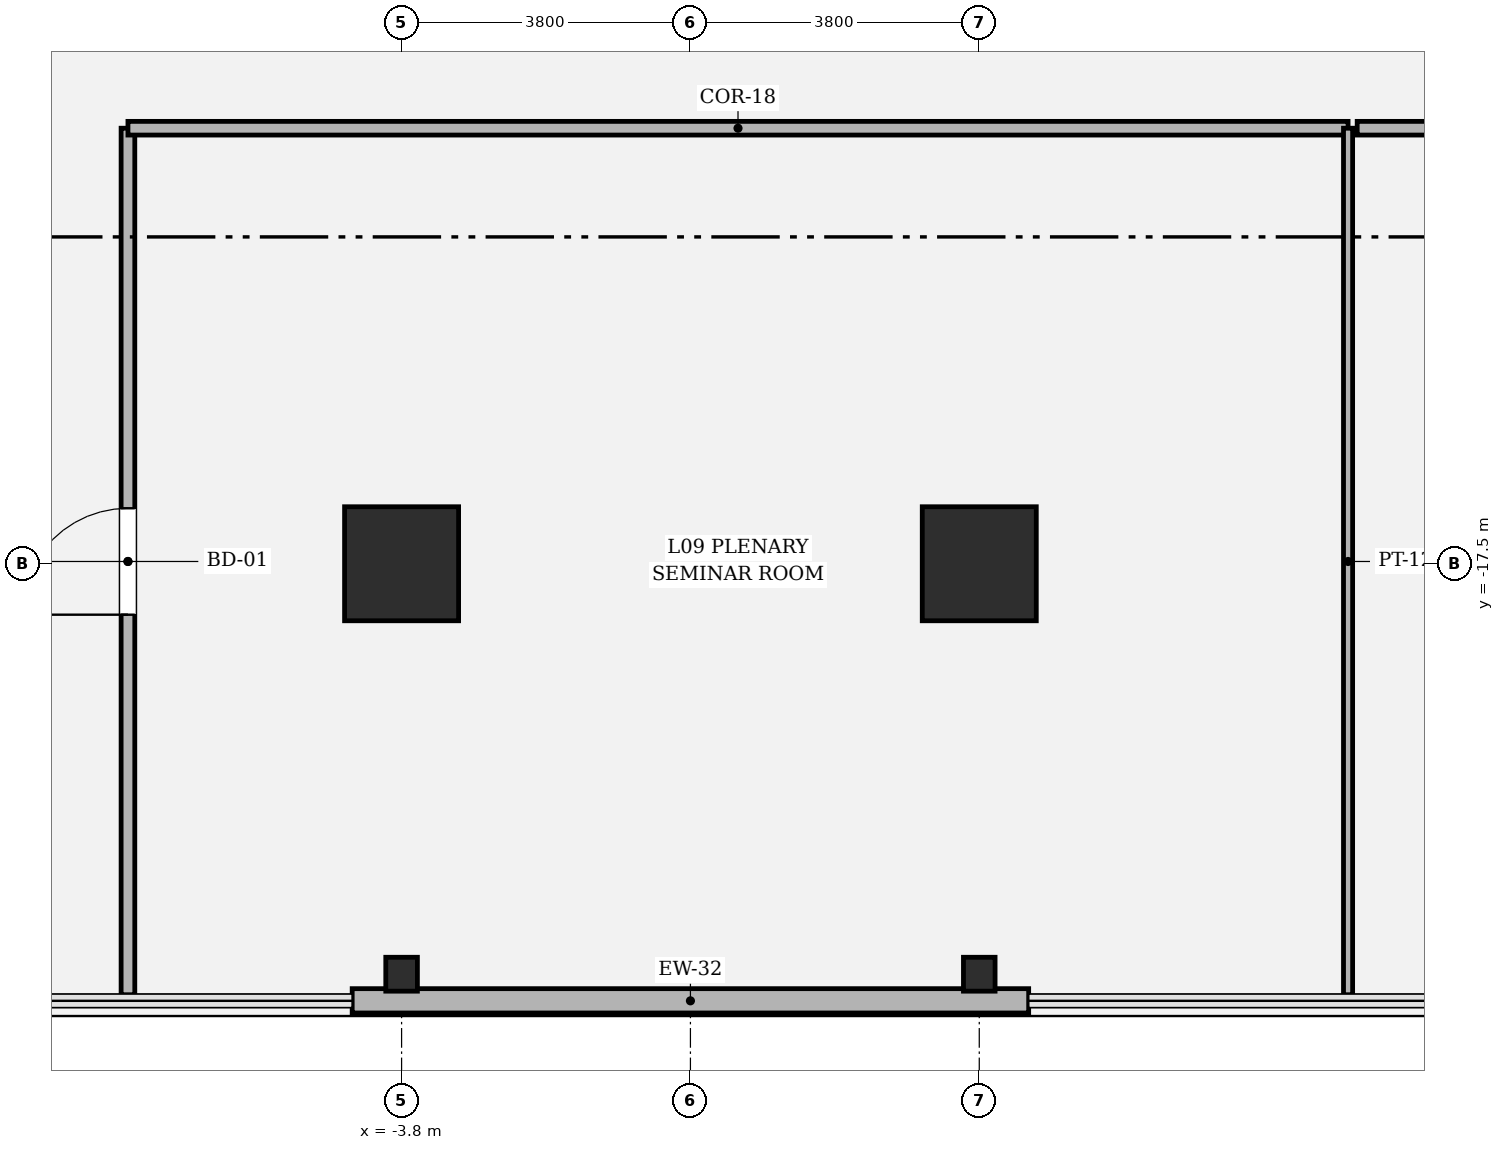
"""IFC4 building model, lengths in metres.
Left out: names, types, materials, properties, quantities, classifications, styles, units other than length and angle.
Written with IfcOpenShell. Run it as: python <this file> out.ifc"""

import sys

from ifc_helpers import new_model, si_unit, direction, frame, frame_2d, origin, origin_2d, place, context, subcontext, project, spatial, rectangle, hollow_rectangle, i_section, extrude, element, fill, save


model = new_model("IFC4")
c1 = context("Model", 3, precision=1e-05, world=origin(), true_north=direction((0.0, 1.0)))
c2 = subcontext(c1, "Body", "Model", "MODEL_VIEW")
j1 = project(units=[si_unit("LENGTHUNIT", "METRE"), si_unit("PLANEANGLEUNIT", "RADIAN")], contexts=[c1])
p1 = place(None, origin())
s1 = spatial("IfcSite", under=j1, at=p1, CompositionType="ELEMENT")
p2 = place(p1, origin())
s2 = spatial("IfcBuilding", under=s1, at=p2, CompositionType="ELEMENT")
p3 = place(p2, frame((0.0, 0.0, 44.4)))
s3 = spatial("IfcBuildingStorey", under=s2, at=p3, CompositionType="ELEMENT", Elevation=44.4)
for number, where, z_axis, x_axis in (
    (1, (-3.8, -17.5, 0.0), (0.0, 0.0, 1.0), (1.0, 0.0, 0.0)),
    (2, (3.8, -17.5, 0.0), (0.0, 0.0, 1.0), (1.0, 0.0, 0.0)),
):
    element("IfcColumn", number, at=place(p3, frame(where, z_axis=z_axis, x_axis=x_axis)), inside=s3, PredefinedType="COLUMN", context=c2, shape_type="SweptSolid", body=[
        extrude(hollow_rectangle(XDim=1.5, YDim=1.5, WallThickness=0.045, at=origin_2d()), origin(), (0.0, 0.0, 1.0), 4.05),
    ])
for number, where, z_axis, x_axis in (
    (3, (-3.8, -22.9, 0.0), (0.0, 0.0, 1.0), (1.0, 0.0, 0.0)),
    (4, (3.8, -22.9, 0.0), (0.0, 0.0, 1.0), (1.0, 0.0, 0.0)),
):
    element("IfcColumn", number, at=place(p3, frame(where, z_axis=z_axis, x_axis=x_axis)), inside=s3, PredefinedType="COLUMN", context=c2, shape_type="SweptSolid", body=[
        extrude(i_section(OverallWidth=0.416, OverallDepth=0.446, WebThickness=0.039, FlangeThickness=0.062, FilletRadius=0.018, at=origin_2d()), origin(), (0.0, 0.0, 1.0), 4.048),
    ])
p4 = place(p3, frame((-4.45, -23.25, 0.0), z_axis=(0.0, 0.0, 1.0), x_axis=(1.0, 0.0, 0.0)))
e5 = element("IfcWall", 5, at=p4, inside=s3, PredefinedType="SOLIDWALL", context=c2, shape_type="SweptSolid", body=[
    extrude(rectangle(XDim=8.9, YDim=0.32, at=frame_2d((4.45, 0.0))), origin(), (0.0, 0.0, 1.0), 2.524),
])
p5 = place(p3, frame((-7.4, -23.17, 0.0), z_axis=(0.0, 0.0, 1.0), x_axis=(0.0, 1.0, 0.0)))
e6 = element("IfcWall", 6, at=p5, inside=s3, PredefinedType="PARTITIONING", context=c2, shape_type="SweptSolid", body=[
    extrude(rectangle(XDim=11.4, YDim=0.18, at=frame_2d((5.7, 0.0))), origin(), (0.0, 0.0, 1.0), 2.524),
])
p6 = place(p5, frame((5.0, 0.0, 0.0)))
e7 = element("IfcOpeningElement", 7, at=p6, cuts=e6, PredefinedType="OPENING", context=c2, shape_type="SweptSolid", body=[
    extrude(rectangle(XDim=1.4, YDim=2.25, at=frame_2d((0.7, 1.125))), frame((0.0, 0.1, 0.0), z_axis=(0.0, -1.0, 0.0), x_axis=(1.0, 0.0, 0.0)), (0.0, 0.0, 1.0), 0.2),
])
p7 = place(p3, frame((-7.4, -11.77, 0.0), z_axis=(0.0, 0.0, 1.0), x_axis=(1.0, 0.0, 0.0)))
e8 = element("IfcWall", 8, at=p7, inside=s3, PredefinedType="PARTITIONING", context=c2, shape_type="SweptSolid", body=[
    extrude(rectangle(XDim=16.052, YDim=0.18, at=frame_2d((8.026, 0.0))), origin(), (0.0, 0.0, 1.0), 3.104),
])
p8 = place(p3, frame((8.652, -11.77, 0.0), z_axis=(0.0, 0.0, 1.0), x_axis=(0.0, -1.0, 0.0)))
e9 = element("IfcWall", 9, at=p8, inside=s3, PredefinedType="PARTITIONING", context=c2, shape_type="SweptSolid", body=[
    extrude(rectangle(XDim=11.4, YDim=0.12, at=frame_2d((5.7, 0.0))), origin(), (0.0, 0.0, 1.0), 2.524),
])
p9 = place(p3, frame((8.772, -11.77, 0.0), z_axis=(0.0, 0.0, 1.0), x_axis=(1.0, 0.0, 0.0)))
e10 = element("IfcWall", 10, at=p9, inside=s3, PredefinedType="PARTITIONING", context=c2, shape_type="SweptSolid", body=[
    extrude(rectangle(XDim=3.998, YDim=0.18, at=frame_2d((1.999, 0.0))), origin(), (0.0, 0.0, 1.0), 3.104),
])
p10 = place(p9, frame((1.299, 0.0, 0.0)))
e11 = element("IfcOpeningElement", 11, at=p10, cuts=e10, PredefinedType="OPENING", context=c2, shape_type="SweptSolid", body=[
    extrude(rectangle(XDim=1.4, YDim=2.25, at=frame_2d((0.7, 1.125))), frame((0.0, 0.1, 0.0), z_axis=(0.0, -1.0, 0.0), x_axis=(1.0, 0.0, 0.0)), (0.0, 0.0, 1.0), 0.2),
])
p11 = place(p6, origin())
e12 = element("IfcDoor", 12, at=p11, inside=s3, OperationType="SINGLE_SWING_LEFT", PredefinedType="DOOR", context=c2, shape_type="SweptSolid", body=[
    extrude(rectangle(XDim=1.4, YDim=2.25, at=frame_2d((0.7, 1.125))), frame((0.0, 0.025, 0.0), z_axis=(0.0, -1.0, 0.0), x_axis=(1.0, 0.0, 0.0)), (0.0, 0.0, 1.0), 0.05),
])
fill(e7, e12)
save(model, sys.argv[1])
